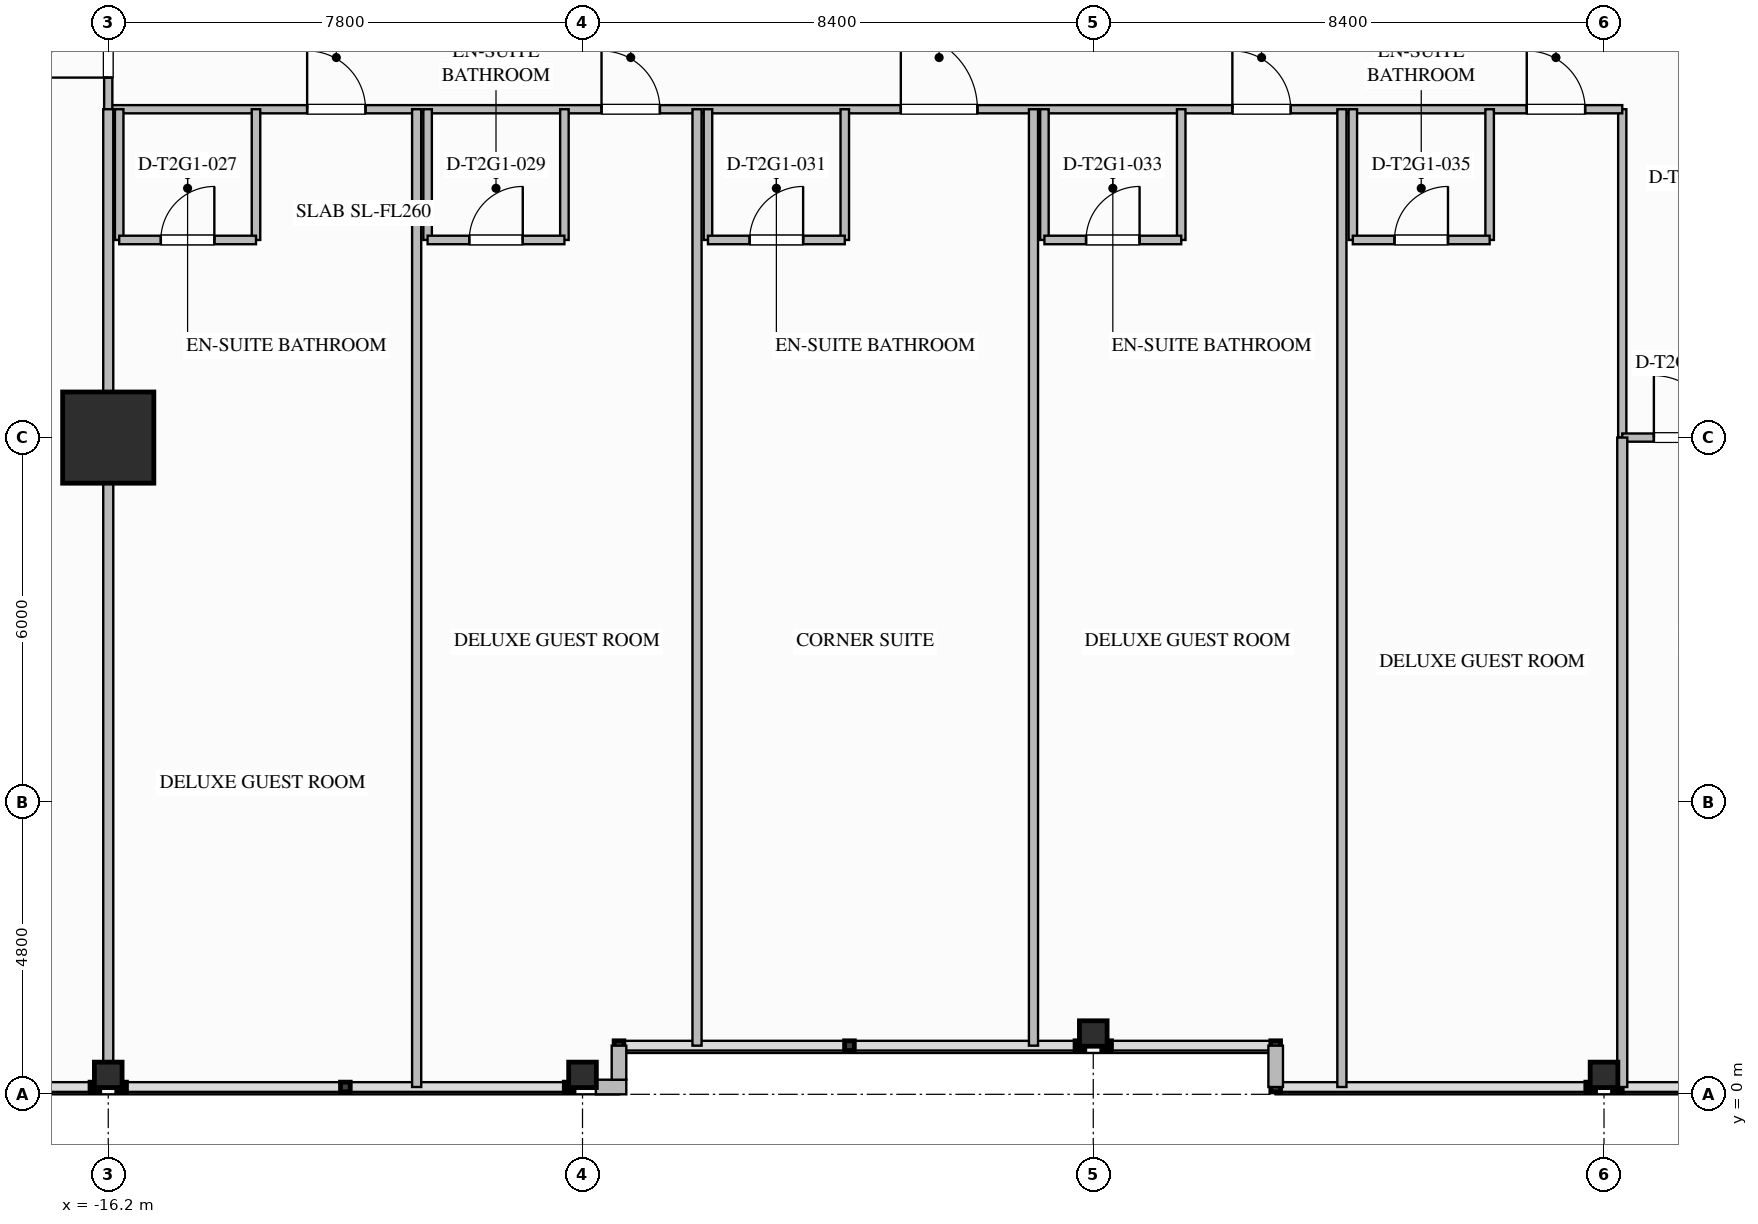
"""IFC4 building model, lengths in metres.
Left out: names, types, materials, properties, quantities, classifications, styles, units other than length and angle.
Written with IfcOpenShell. Run it as: python <this file> out.ifc"""

import sys

from ifc_helpers import new_model, si_unit, direction, frame, frame_2d, origin, origin_2d, place, context, subcontext, project, spatial, rectangle, i_section, extrude, element, fill, save


model = new_model("IFC4")
c1 = context("Model", 3, precision=1e-05, world=origin(), true_north=direction((0.0, 1.0)))
c2 = subcontext(c1, "Body", "Model", "MODEL_VIEW")
j1 = project(units=[si_unit("LENGTHUNIT", "METRE"), si_unit("PLANEANGLEUNIT", "RADIAN")], contexts=[c1])
p1 = place(None, origin())
s1 = spatial("IfcSite", under=j1, at=p1, CompositionType="ELEMENT")
p2 = place(p1, origin())
s2 = spatial("IfcBuilding", under=s1, at=p2, CompositionType="ELEMENT")
p3 = place(p2, frame((0.0, 0.0, 91.8)))
s3 = spatial("IfcBuildingStorey", under=s2, at=p3, CompositionType="ELEMENT", Elevation=91.8)
p4 = place(p3, frame((-16.2, 10.8, 0.0), z_axis=(0.0, 0.0, 1.0), x_axis=(1.0, 0.0, 0.0)))
e1 = element("IfcColumn", 1, at=p4, inside=s3, PredefinedType="COLUMN", context=c2, shape_type="SweptSolid", body=[
    extrude(rectangle(XDim=1.5, YDim=1.5, at=origin_2d()), origin(), (0.0, 0.0, 1.0), 3.5),
])
for number, where, z_axis, x_axis in (
    (2, (-16.2, 0.32, 0.0), (0.0, 0.0, 1.0), (0.0, 1.0, 0.0)),
    (3, (-8.4, 0.32, 0.0), (0.0, 0.0, 1.0), (0.0, 1.0, 0.0)),
    (4, (0.0, 1.0, 0.0), (0.0, 0.0, 1.0), (0.0, 1.0, 0.0)),
    (5, (8.4, 0.32, 0.0), (0.0, 0.0, 1.0), (0.0, 1.0, 0.0)),
):
    element("IfcColumn", number, at=place(p3, frame(where, z_axis=z_axis, x_axis=x_axis)), inside=s3, PredefinedType="COLUMN", context=c2, shape_type="SweptSolid", body=[
        extrude(i_section(OverallWidth=0.418, OverallDepth=0.455, WebThickness=0.042, FlangeThickness=0.068, FilletRadius=0.03, at=origin_2d()), origin(), (0.0, 0.0, 1.0), 3.497),
    ])
p5 = place(p3, frame((-7.68, 0.12, 0.0), z_axis=(0.0, 0.0, 1.0), x_axis=(-1.0, 0.0, 0.0)))
e6 = element("IfcWall", 6, at=p5, inside=s3, PredefinedType="STANDARD", context=c2, shape_type="SweptSolid", body=[
    extrude(rectangle(XDim=0.5, YDim=0.24, at=frame_2d((0.25, 0.0))), origin(), (0.0, 0.0, 1.0), 3.24),
])
p6 = place(p3, frame((3.0, 0.12, 0.0), z_axis=(0.0, 0.0, 1.0), x_axis=(0.0, 1.0, 0.0)))
e7 = element("IfcWall", 7, at=p6, inside=s3, PredefinedType="STANDARD", context=c2, shape_type="SweptSolid", body=[
    extrude(rectangle(XDim=0.68, YDim=0.24, at=frame_2d((0.34, 0.0))), origin(), (0.0, 0.0, 1.0), 3.24),
])
p7 = place(p3, frame((-7.8, 0.8, 0.0), z_axis=(0.0, 0.0, 1.0), x_axis=(0.0, -1.0, 0.0)))
e8 = element("IfcWall", 8, at=p7, inside=s3, PredefinedType="STANDARD", context=c2, shape_type="SweptSolid", body=[
    extrude(rectangle(XDim=0.56, YDim=0.24, at=frame_2d((0.28, 0.0))), origin(), (0.0, 0.0, 1.0), 3.24),
])
p8 = place(p3, frame((8.7, 10.8, 0.0), z_axis=(0.0, 0.0, 1.0), x_axis=(0.0, 1.0, 0.0)))
e9 = element("IfcWall", 9, at=p8, inside=s3, PredefinedType="PARTITIONING", context=c2, shape_type="SweptSolid", body=[
    extrude(rectangle(XDim=5.4, YDim=0.135, at=frame_2d((2.7, 0.0))), origin(), (0.0, 0.0, 1.0), 3.24),
])
p9 = place(p3, frame((-16.2, 16.2, 0.0), z_axis=(0.0, 0.0, 1.0), x_axis=(1.0, 0.0, 0.0)))
e10 = element("IfcWall", 10, at=p9, inside=s3, PredefinedType="PARTITIONING", context=c2, shape_type="SweptSolid", body=[
    extrude(rectangle(XDim=24.9, YDim=0.135, at=frame_2d((12.45, 0.0))), origin(), (0.0, 0.0, 1.0), 3.24),
])
p10 = place(p9, frame((3.271, 0.0, 0.0)))
e11 = element("IfcOpeningElement", 11, at=p10, cuts=e10, PredefinedType="OPENING", context=c2, shape_type="SweptSolid", body=[
    extrude(rectangle(XDim=0.96, YDim=2.15, at=frame_2d((0.48, 1.075))), frame((0.0, 0.077, 0.0), z_axis=(0.0, -1.0, 0.0), x_axis=(1.0, 0.0, 0.0)), (0.0, 0.0, 1.0), 0.155),
])
p11 = place(p9, frame((8.113, 0.0, 0.0)))
e12 = element("IfcOpeningElement", 12, at=p11, cuts=e10, PredefinedType="OPENING", context=c2, shape_type="SweptSolid", body=[
    extrude(rectangle(XDim=0.96, YDim=2.15, at=frame_2d((0.48, 1.075))), frame((0.0, 0.077, 0.0), z_axis=(0.0, -1.0, 0.0), x_axis=(1.0, 0.0, 0.0)), (0.0, 0.0, 1.0), 0.155),
])
p12 = place(p9, frame((13.035, 0.0, 0.0)))
e13 = element("IfcOpeningElement", 13, at=p12, cuts=e10, PredefinedType="OPENING", context=c2, shape_type="SweptSolid", body=[
    extrude(rectangle(XDim=1.26, YDim=2.2, at=frame_2d((0.63, 1.1))), frame((0.0, 0.077, 0.0), z_axis=(0.0, -1.0, 0.0), x_axis=(1.0, 0.0, 0.0)), (0.0, 0.0, 1.0), 0.155),
])
p13 = place(p9, frame((18.488, 0.0, 0.0)))
e14 = element("IfcOpeningElement", 14, at=p13, cuts=e10, PredefinedType="OPENING", context=c2, shape_type="SweptSolid", body=[
    extrude(rectangle(XDim=0.96, YDim=2.15, at=frame_2d((0.48, 1.075))), frame((0.0, 0.077, 0.0), z_axis=(0.0, -1.0, 0.0), x_axis=(1.0, 0.0, 0.0)), (0.0, 0.0, 1.0), 0.155),
])
p14 = place(p9, frame((23.329, 0.0, 0.0)))
e15 = element("IfcOpeningElement", 15, at=p14, cuts=e10, PredefinedType="OPENING", context=c2, shape_type="SweptSolid", body=[
    extrude(rectangle(XDim=0.96, YDim=2.15, at=frame_2d((0.48, 1.075))), frame((0.0, 0.077, 0.0), z_axis=(0.0, -1.0, 0.0), x_axis=(1.0, 0.0, 0.0)), (0.0, 0.0, 1.0), 0.155),
])
p15 = place(p3, frame((-16.2, 16.2, 0.0), z_axis=(0.0, 0.0, 1.0), x_axis=(0.0, 1.0, 0.0)))
e16 = element("IfcWall", 16, at=p15, inside=s3, PredefinedType="PARTITIONING", context=c2, shape_type="SweptSolid", body=[
    extrude(rectangle(XDim=2.1, YDim=0.135, at=frame_2d((1.05, 0.0))), origin(), (0.0, 0.0, 1.0), 2.452),
])
p16 = place(p15, frame((0.52, 0.0, 0.0)))
e17 = element("IfcOpeningElement", 17, at=p16, cuts=e16, PredefinedType="OPENING", context=c2, shape_type="SweptSolid", body=[
    extrude(rectangle(XDim=1.02, YDim=2.15, at=frame_2d((0.51, 1.075))), frame((0.0, 0.077, 0.0), z_axis=(0.0, -1.0, 0.0), x_axis=(1.0, 0.0, 0.0)), (0.0, 0.0, 1.0), 0.155),
])
p17 = place(p3, frame((8.7, 10.8, 0.0), z_axis=(0.0, 0.0, 1.0), x_axis=(1.0, 0.0, 0.0)))
e18 = element("IfcWall", 18, at=p17, inside=s3, PredefinedType="PARTITIONING", context=c2, shape_type="SweptSolid", body=[
    extrude(rectangle(XDim=2.1, YDim=0.135, at=frame_2d((1.05, 0.0))), origin(), (0.0, 0.0, 1.0), 2.452),
])
p18 = place(p17, frame((0.52, 0.0, 0.0)))
e19 = element("IfcOpeningElement", 19, at=p18, cuts=e18, PredefinedType="OPENING", context=c2, shape_type="SweptSolid", body=[
    extrude(rectangle(XDim=1.02, YDim=2.15, at=frame_2d((0.51, 1.075))), frame((0.0, 0.077, 0.0), z_axis=(0.0, -1.0, 0.0), x_axis=(1.0, 0.0, 0.0)), (0.0, 0.0, 1.0), 0.155),
])
p19 = place(p3, frame((-16.2, 0.12, 0.0), z_axis=(0.0, 0.0, 1.0), x_axis=(0.0, 1.0, 0.0)))
e20 = element("IfcWall", 20, at=p19, inside=s3, PredefinedType="PARTITIONING", context=c2, shape_type="SweptSolid", body=[
    extrude(rectangle(XDim=16.08, YDim=0.165, at=frame_2d((8.04, 0.0))), origin(), (0.0, 0.0, 1.0), 2.452),
])
p20 = place(p3, frame((8.7, 0.12, 0.0), z_axis=(0.0, 0.0, 1.0), x_axis=(0.0, 1.0, 0.0)))
e21 = element("IfcWall", 21, at=p20, inside=s3, PredefinedType="PARTITIONING", context=c2, shape_type="SweptSolid", body=[
    extrude(rectangle(XDim=10.68, YDim=0.165, at=frame_2d((5.34, 0.0))), origin(), (0.0, 0.0, 1.0), 2.452),
])
p21 = place(p3, frame((-16.02, 16.2, 0.0), z_axis=(0.0, 0.0, 1.0), x_axis=(0.0, -1.0, 0.0)))
e22 = element("IfcWall", 22, at=p21, inside=s3, PredefinedType="PLUMBINGWALL", context=c2, shape_type="SweptSolid", body=[
    extrude(rectangle(XDim=2.15, YDim=0.14, at=frame_2d((1.075, 0.0))), origin(), (0.0, 0.0, 1.0), 2.452),
])
p22 = place(p3, frame((-13.77, 16.2, 0.0), z_axis=(0.0, 0.0, 1.0), x_axis=(0.0, -1.0, 0.0)))
e23 = element("IfcWall", 23, at=p22, inside=s3, PredefinedType="PLUMBINGWALL", context=c2, shape_type="SweptSolid", body=[
    extrude(rectangle(XDim=2.15, YDim=0.14, at=frame_2d((1.075, 0.0))), origin(), (0.0, 0.0, 1.0), 3.24),
])
p23 = place(p3, frame((-16.02, 14.05, 0.0), z_axis=(0.0, 0.0, 1.0), x_axis=(1.0, 0.0, 0.0)))
e24 = element("IfcWall", 24, at=p23, inside=s3, PredefinedType="PLUMBINGWALL", context=c2, shape_type="SweptSolid", body=[
    extrude(rectangle(XDim=2.25, YDim=0.14, at=frame_2d((1.125, 0.0))), origin(), (0.0, 0.0, 1.0), 3.24),
])
p24 = place(p23, frame((0.685, 0.0, 0.0)))
e25 = element("IfcOpeningElement", 25, at=p24, cuts=e24, PredefinedType="OPENING", context=c2, shape_type="SweptSolid", body=[
    extrude(rectangle(XDim=0.88, YDim=2.1, at=frame_2d((0.44, 1.05))), frame((0.0, 0.08, 0.0), z_axis=(0.0, -1.0, 0.0), x_axis=(1.0, 0.0, 0.0)), (0.0, 0.0, 1.0), 0.16),
])
p25 = place(p3, frame((-11.128, 0.12, 0.0), z_axis=(0.0, 0.0, 1.0), x_axis=(0.0, 1.0, 0.0)))
e26 = element("IfcWall", 26, at=p25, inside=s3, PredefinedType="PARTITIONING", context=c2, shape_type="SweptSolid", body=[
    extrude(rectangle(XDim=16.08, YDim=0.15, at=frame_2d((8.04, 0.0))), origin(), (0.0, 0.0, 1.0), 3.24),
])
for number, where, z_axis, x_axis in (
    (27, (-10.948, 16.2, 0.0), (0.0, 0.0, 1.0), (0.0, -1.0, 0.0)),
    (28, (-8.698, 16.2, 0.0), (0.0, 0.0, 1.0), (0.0, -1.0, 0.0)),
):
    element("IfcWall", number, at=place(p3, frame(where, z_axis=z_axis, x_axis=x_axis)), inside=s3, PredefinedType="PLUMBINGWALL", context=c2, shape_type="SweptSolid", body=[
        extrude(rectangle(XDim=2.15, YDim=0.14, at=frame_2d((1.075, 0.0))), origin(), (0.0, 0.0, 1.0), 3.24),
    ])
p26 = place(p3, frame((-10.948, 14.05, 0.0), z_axis=(0.0, 0.0, 1.0), x_axis=(1.0, 0.0, 0.0)))
e29 = element("IfcWall", 29, at=p26, inside=s3, PredefinedType="PLUMBINGWALL", context=c2, shape_type="SweptSolid", body=[
    extrude(rectangle(XDim=2.25, YDim=0.14, at=frame_2d((1.125, 0.0))), origin(), (0.0, 0.0, 1.0), 3.24),
])
p27 = place(p26, frame((0.685, 0.0, 0.0)))
e30 = element("IfcOpeningElement", 30, at=p27, cuts=e29, PredefinedType="OPENING", context=c2, shape_type="SweptSolid", body=[
    extrude(rectangle(XDim=0.88, YDim=2.1, at=frame_2d((0.44, 1.05))), frame((0.0, 0.08, 0.0), z_axis=(0.0, -1.0, 0.0), x_axis=(1.0, 0.0, 0.0)), (0.0, 0.0, 1.0), 0.16),
])
p28 = place(p3, frame((-6.517, 0.8, 0.0), z_axis=(0.0, 0.0, 1.0), x_axis=(0.0, 1.0, 0.0)))
e31 = element("IfcWall", 31, at=p28, inside=s3, PredefinedType="PARTITIONING", context=c2, shape_type="SweptSolid", body=[
    extrude(rectangle(XDim=15.4, YDim=0.15, at=frame_2d((7.7, 0.0))), origin(), (0.0, 0.0, 1.0), 3.24),
])
for number, where, z_axis, x_axis in (
    (32, (-6.337, 16.2, 0.0), (0.0, 0.0, 1.0), (0.0, -1.0, 0.0)),
    (33, (-4.087, 16.2, 0.0), (0.0, 0.0, 1.0), (0.0, -1.0, 0.0)),
):
    element("IfcWall", number, at=place(p3, frame(where, z_axis=z_axis, x_axis=x_axis)), inside=s3, PredefinedType="PLUMBINGWALL", context=c2, shape_type="SweptSolid", body=[
        extrude(rectangle(XDim=2.15, YDim=0.14, at=frame_2d((1.075, 0.0))), origin(), (0.0, 0.0, 1.0), 3.24),
    ])
p29 = place(p3, frame((-6.337, 14.05, 0.0), z_axis=(0.0, 0.0, 1.0), x_axis=(1.0, 0.0, 0.0)))
e34 = element("IfcWall", 34, at=p29, inside=s3, PredefinedType="PLUMBINGWALL", context=c2, shape_type="SweptSolid", body=[
    extrude(rectangle(XDim=2.25, YDim=0.14, at=frame_2d((1.125, 0.0))), origin(), (0.0, 0.0, 1.0), 3.24),
])
p30 = place(p29, frame((0.685, 0.0, 0.0)))
e35 = element("IfcOpeningElement", 35, at=p30, cuts=e34, PredefinedType="OPENING", context=c2, shape_type="SweptSolid", body=[
    extrude(rectangle(XDim=0.88, YDim=2.1, at=frame_2d((0.44, 1.05))), frame((0.0, 0.08, 0.0), z_axis=(0.0, -1.0, 0.0), x_axis=(1.0, 0.0, 0.0)), (0.0, 0.0, 1.0), 0.16),
])
p31 = place(p3, frame((-0.983, 0.8, 0.0), z_axis=(0.0, 0.0, 1.0), x_axis=(0.0, 1.0, 0.0)))
e36 = element("IfcWall", 36, at=p31, inside=s3, PredefinedType="PARTITIONING", context=c2, shape_type="SweptSolid", body=[
    extrude(rectangle(XDim=15.4, YDim=0.15, at=frame_2d((7.7, 0.0))), origin(), (0.0, 0.0, 1.0), 3.24),
])
for number, where, z_axis, x_axis in (
    (37, (-0.803, 16.2, 0.0), (0.0, 0.0, 1.0), (0.0, -1.0, 0.0)),
    (38, (1.447, 16.2, 0.0), (0.0, 0.0, 1.0), (0.0, -1.0, 0.0)),
):
    element("IfcWall", number, at=place(p3, frame(where, z_axis=z_axis, x_axis=x_axis)), inside=s3, PredefinedType="PLUMBINGWALL", context=c2, shape_type="SweptSolid", body=[
        extrude(rectangle(XDim=2.15, YDim=0.14, at=frame_2d((1.075, 0.0))), origin(), (0.0, 0.0, 1.0), 3.24),
    ])
p32 = place(p3, frame((-0.803, 14.05, 0.0), z_axis=(0.0, 0.0, 1.0), x_axis=(1.0, 0.0, 0.0)))
e39 = element("IfcWall", 39, at=p32, inside=s3, PredefinedType="PLUMBINGWALL", context=c2, shape_type="SweptSolid", body=[
    extrude(rectangle(XDim=2.25, YDim=0.14, at=frame_2d((1.125, 0.0))), origin(), (0.0, 0.0, 1.0), 3.24),
])
p33 = place(p32, frame((0.685, 0.0, 0.0)))
e40 = element("IfcOpeningElement", 40, at=p33, cuts=e39, PredefinedType="OPENING", context=c2, shape_type="SweptSolid", body=[
    extrude(rectangle(XDim=0.88, YDim=2.1, at=frame_2d((0.44, 1.05))), frame((0.0, 0.08, 0.0), z_axis=(0.0, -1.0, 0.0), x_axis=(1.0, 0.0, 0.0)), (0.0, 0.0, 1.0), 0.16),
])
p34 = place(p3, frame((4.089, 0.12, 0.0), z_axis=(0.0, 0.0, 1.0), x_axis=(0.0, 1.0, 0.0)))
e41 = element("IfcWall", 41, at=p34, inside=s3, PredefinedType="PARTITIONING", context=c2, shape_type="SweptSolid", body=[
    extrude(rectangle(XDim=16.08, YDim=0.15, at=frame_2d((8.04, 0.0))), origin(), (0.0, 0.0, 1.0), 3.24),
])
for number, where, z_axis, x_axis in (
    (42, (4.269, 16.2, 0.0), (0.0, 0.0, 1.0), (0.0, -1.0, 0.0)),
    (43, (6.519, 16.2, 0.0), (0.0, 0.0, 1.0), (0.0, -1.0, 0.0)),
):
    element("IfcWall", number, at=place(p3, frame(where, z_axis=z_axis, x_axis=x_axis)), inside=s3, PredefinedType="PLUMBINGWALL", context=c2, shape_type="SweptSolid", body=[
        extrude(rectangle(XDim=2.15, YDim=0.14, at=frame_2d((1.075, 0.0))), origin(), (0.0, 0.0, 1.0), 3.24),
    ])
p35 = place(p3, frame((4.269, 14.05, 0.0), z_axis=(0.0, 0.0, 1.0), x_axis=(1.0, 0.0, 0.0)))
e44 = element("IfcWall", 44, at=p35, inside=s3, PredefinedType="PLUMBINGWALL", context=c2, shape_type="SweptSolid", body=[
    extrude(rectangle(XDim=2.25, YDim=0.14, at=frame_2d((1.125, 0.0))), origin(), (0.0, 0.0, 1.0), 3.24),
])
p36 = place(p35, frame((0.685, 0.0, 0.0)))
e45 = element("IfcOpeningElement", 45, at=p36, cuts=e44, PredefinedType="OPENING", context=c2, shape_type="SweptSolid", body=[
    extrude(rectangle(XDim=0.88, YDim=2.1, at=frame_2d((0.44, 1.05))), frame((0.0, 0.08, 0.0), z_axis=(0.0, -1.0, 0.0), x_axis=(1.0, 0.0, 0.0)), (0.0, 0.0, 1.0), 0.16),
])
p37 = place(p16, origin())
e46 = element("IfcDoor", 46, at=p37, inside=s3, OperationType="SINGLE_SWING_LEFT", PredefinedType="DOOR", context=c2, shape_type="SweptSolid", body=[
    extrude(rectangle(XDim=1.02, YDim=2.15, at=frame_2d((0.51, 1.075))), frame((0.0, 0.025, 0.0), z_axis=(0.0, -1.0, 0.0), x_axis=(1.0, 0.0, 0.0)), (0.0, 0.0, 1.0), 0.05),
])
fill(e17, e46)
p38 = place(p18, origin())
e47 = element("IfcDoor", 47, at=p38, inside=s3, OperationType="SINGLE_SWING_LEFT", PredefinedType="DOOR", context=c2, shape_type="SweptSolid", body=[
    extrude(rectangle(XDim=1.02, YDim=2.15, at=frame_2d((0.51, 1.075))), frame((0.0, 0.025, 0.0), z_axis=(0.0, -1.0, 0.0), x_axis=(1.0, 0.0, 0.0)), (0.0, 0.0, 1.0), 0.05),
])
fill(e19, e47)
p39 = place(p24, origin())
e48 = element("IfcDoor", 48, at=p39, inside=s3, OperationType="SINGLE_SWING_RIGHT", PredefinedType="DOOR", context=c2, shape_type="SweptSolid", body=[
    extrude(rectangle(XDim=0.88, YDim=2.1, at=frame_2d((0.44, 1.05))), frame((0.0, 0.025, 0.0), z_axis=(0.0, -1.0, 0.0), x_axis=(1.0, 0.0, 0.0)), (0.0, 0.0, 1.0), 0.05),
])
fill(e25, e48)
p40 = place(p10, origin())
e49 = element("IfcDoor", 49, at=p40, inside=s3, OperationType="SINGLE_SWING_LEFT", PredefinedType="DOOR", context=c2, shape_type="SweptSolid", body=[
    extrude(rectangle(XDim=0.96, YDim=2.15, at=frame_2d((0.48, 1.075))), frame((0.0, 0.025, 0.0), z_axis=(0.0, -1.0, 0.0), x_axis=(1.0, 0.0, 0.0)), (0.0, 0.0, 1.0), 0.05),
])
fill(e11, e49)
p41 = place(p27, origin())
e50 = element("IfcDoor", 50, at=p41, inside=s3, OperationType="SINGLE_SWING_RIGHT", PredefinedType="DOOR", context=c2, shape_type="SweptSolid", body=[
    extrude(rectangle(XDim=0.88, YDim=2.1, at=frame_2d((0.44, 1.05))), frame((0.0, 0.025, 0.0), z_axis=(0.0, -1.0, 0.0), x_axis=(1.0, 0.0, 0.0)), (0.0, 0.0, 1.0), 0.05),
])
fill(e30, e50)
p42 = place(p11, origin())
e51 = element("IfcDoor", 51, at=p42, inside=s3, OperationType="SINGLE_SWING_LEFT", PredefinedType="DOOR", context=c2, shape_type="SweptSolid", body=[
    extrude(rectangle(XDim=0.96, YDim=2.15, at=frame_2d((0.48, 1.075))), frame((0.0, 0.025, 0.0), z_axis=(0.0, -1.0, 0.0), x_axis=(1.0, 0.0, 0.0)), (0.0, 0.0, 1.0), 0.05),
])
fill(e12, e51)
p43 = place(p30, origin())
e52 = element("IfcDoor", 52, at=p43, inside=s3, OperationType="SINGLE_SWING_RIGHT", PredefinedType="DOOR", context=c2, shape_type="SweptSolid", body=[
    extrude(rectangle(XDim=0.88, YDim=2.1, at=frame_2d((0.44, 1.05))), frame((0.0, 0.025, 0.0), z_axis=(0.0, -1.0, 0.0), x_axis=(1.0, 0.0, 0.0)), (0.0, 0.0, 1.0), 0.05),
])
fill(e35, e52)
p44 = place(p12, origin())
e53 = element("IfcDoor", 53, at=p44, inside=s3, OperationType="SINGLE_SWING_LEFT", PredefinedType="DOOR", context=c2, shape_type="SweptSolid", body=[
    extrude(rectangle(XDim=1.26, YDim=2.2, at=frame_2d((0.63, 1.1))), frame((0.0, 0.025, 0.0), z_axis=(0.0, -1.0, 0.0), x_axis=(1.0, 0.0, 0.0)), (0.0, 0.0, 1.0), 0.05),
])
fill(e13, e53)
p45 = place(p33, origin())
e54 = element("IfcDoor", 54, at=p45, inside=s3, OperationType="SINGLE_SWING_RIGHT", PredefinedType="DOOR", context=c2, shape_type="SweptSolid", body=[
    extrude(rectangle(XDim=0.88, YDim=2.1, at=frame_2d((0.44, 1.05))), frame((0.0, 0.025, 0.0), z_axis=(0.0, -1.0, 0.0), x_axis=(1.0, 0.0, 0.0)), (0.0, 0.0, 1.0), 0.05),
])
fill(e40, e54)
p46 = place(p13, origin())
e55 = element("IfcDoor", 55, at=p46, inside=s3, OperationType="SINGLE_SWING_LEFT", PredefinedType="DOOR", context=c2, shape_type="SweptSolid", body=[
    extrude(rectangle(XDim=0.96, YDim=2.15, at=frame_2d((0.48, 1.075))), frame((0.0, 0.025, 0.0), z_axis=(0.0, -1.0, 0.0), x_axis=(1.0, 0.0, 0.0)), (0.0, 0.0, 1.0), 0.05),
])
fill(e14, e55)
p47 = place(p36, origin())
e56 = element("IfcDoor", 56, at=p47, inside=s3, OperationType="SINGLE_SWING_RIGHT", PredefinedType="DOOR", context=c2, shape_type="SweptSolid", body=[
    extrude(rectangle(XDim=0.88, YDim=2.1, at=frame_2d((0.44, 1.05))), frame((0.0, 0.025, 0.0), z_axis=(0.0, -1.0, 0.0), x_axis=(1.0, 0.0, 0.0)), (0.0, 0.0, 1.0), 0.05),
])
fill(e45, e56)
p48 = place(p14, origin())
e57 = element("IfcDoor", 57, at=p48, inside=s3, OperationType="SINGLE_SWING_LEFT", PredefinedType="DOOR", context=c2, shape_type="SweptSolid", body=[
    extrude(rectangle(XDim=0.96, YDim=2.15, at=frame_2d((0.48, 1.075))), frame((0.0, 0.025, 0.0), z_axis=(0.0, -1.0, 0.0), x_axis=(1.0, 0.0, 0.0)), (0.0, 0.0, 1.0), 0.05),
])
fill(e15, e57)
save(model, sys.argv[1])
